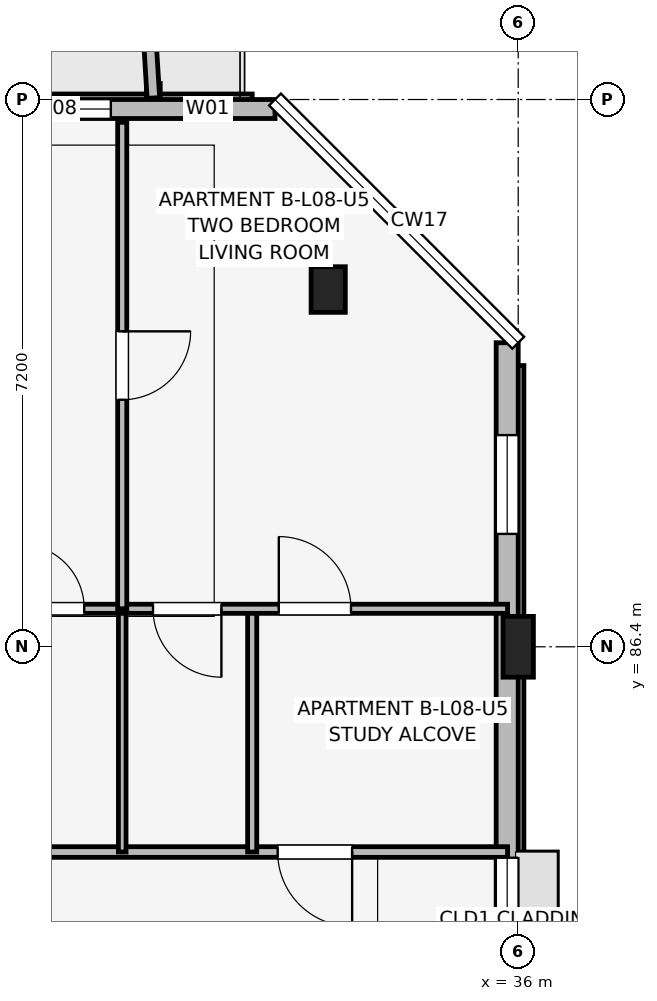
"""IFC4 building model, lengths in metres.
Left out: names, types, materials, properties, quantities, classifications, styles, units other than length and angle.
Written with IfcOpenShell. Run it as: python <this file> out.ifc"""

import sys

from ifc_helpers import new_model, si_unit, direction, frame, frame_2d, origin, origin_2d, place, context, subcontext, project, spatial, rectangle, extrude, element, fill, save


model = new_model("IFC4")
c1 = context("Model", 3, precision=1e-05, world=origin(), true_north=direction((0.0, 1.0)))
c2 = subcontext(c1, "Body", "Model", "MODEL_VIEW")
j1 = project(units=[si_unit("LENGTHUNIT", "METRE"), si_unit("PLANEANGLEUNIT", "RADIAN")], contexts=[c1])
p1 = place(None, origin())
s1 = spatial("IfcSite", under=j1, at=p1, CompositionType="ELEMENT")
p2 = place(p1, origin())
s2 = spatial("IfcBuilding", under=s1, at=p2, CompositionType="ELEMENT")
p3 = place(p2, frame((0.0, 0.0, 27.6)))
s3 = spatial("IfcBuildingStorey", under=s2, at=p3, CompositionType="ELEMENT", Elevation=27.6)
p4 = place(p3, frame((36.0, 86.4, 0.0), z_axis=(0.0, 0.0, 1.0), x_axis=(1.0, 0.0, 0.0)))
e1 = element("IfcColumn", 1, at=p4, inside=s3, PredefinedType="COLUMN", context=c2, shape_type="SweptSolid", body=[
    extrude(rectangle(XDim=0.4, YDim=0.8, at=origin_2d()), origin(), (0.0, 0.0, 1.0), 3.15),
])
p5 = place(p3, frame((33.5, 91.1, 0.0), z_axis=(0.0, 0.0, 1.0), x_axis=(1.0, 0.0, 0.0)))
e2 = element("IfcColumn", 2, at=p5, inside=s3, PredefinedType="COLUMN", context=c2, shape_type="SweptSolid", body=[
    extrude(rectangle(XDim=0.45, YDim=0.6, at=origin_2d()), origin(), (0.0, 0.0, 1.0), 3.15),
])
p6 = place(p3, frame((35.855, 75.2, 0.0), z_axis=(0.0, 0.0, 1.0), x_axis=(0.0, 1.0, 0.0)))
e3 = element("IfcWall", 3, at=p6, inside=s3, PredefinedType="SOLIDWALL", context=c2, shape_type="SweptSolid", body=[
    extrude(rectangle(XDim=15.2, YDim=0.29, at=frame_2d((7.6, 0.0))), origin(), (0.0, 0.0, 1.0), 2.43),
])
p7 = place(p6, frame((6.775, 0.0, 1.05)))
e4 = element("IfcOpeningElement", 4, at=p7, cuts=e3, PredefinedType="OPENING", context=c2, shape_type="SweptSolid", body=[
    extrude(rectangle(XDim=1.65, YDim=1.15, at=frame_2d((0.825, 0.575))), frame((0.0, 0.155, 0.0), z_axis=(0.0, -1.0, 0.0), x_axis=(1.0, 0.0, 0.0)), (0.0, 0.0, 1.0), 0.31),
])
p8 = place(p6, frame((12.685, 0.0, 0.75)))
e5 = element("IfcOpeningElement", 5, at=p8, cuts=e3, PredefinedType="OPENING", context=c2, shape_type="SweptSolid", body=[
    extrude(rectangle(XDim=1.3, YDim=1.55, at=frame_2d((0.65, 0.775))), frame((0.0, 0.155, 0.0), z_axis=(0.0, -1.0, 0.0), x_axis=(1.0, 0.0, 0.0)), (0.0, 0.0, 1.0), 0.31),
])
p9 = place(p3, frame((32.8, 93.475, 0.0), z_axis=(0.0, 0.0, 1.0), x_axis=(-1.0, 0.0, 0.0)))
e6 = element("IfcWall", 6, at=p9, inside=s3, PredefinedType="SOLIDWALL", context=c2, shape_type="SweptSolid", body=[
    extrude(rectangle(XDim=29.6, YDim=0.25, at=frame_2d((14.8, 0.0))), origin(), (0.0, 0.0, 1.0), 2.43),
])
p10 = place(p9, frame((22.825, 0.0, 0.0), z_axis=(0.0, 0.0, 1.0), x_axis=(-1.0, 0.0, 0.0)))
e7 = element("IfcOpeningElement", 7, at=p10, cuts=e6, PredefinedType="OPENING", context=c2, shape_type="SweptSolid", body=[
    extrude(rectangle(XDim=1.65, YDim=2.15, at=frame_2d((0.825, 1.075))), frame((0.0, 0.135, 0.0), z_axis=(0.0, -1.0, 0.0), x_axis=(1.0, 0.0, 0.0)), (0.0, 0.0, 1.0), 0.27),
])
p11 = place(p9, frame((8.35, 0.0, 0.0), z_axis=(0.0, 0.0, 1.0), x_axis=(-1.0, 0.0, 0.0)))
e8 = element("IfcOpeningElement", 8, at=p11, cuts=e6, PredefinedType="OPENING", context=c2, shape_type="SweptSolid", body=[
    extrude(rectangle(XDim=1.5, YDim=2.15, at=frame_2d((0.75, 1.075))), frame((0.0, 0.135, 0.0), z_axis=(0.0, -1.0, 0.0), x_axis=(1.0, 0.0, 0.0)), (0.0, 0.0, 1.0), 0.27),
])
p12 = place(p9, frame((25.99, 0.0, 0.7)))
e9 = element("IfcOpeningElement", 9, at=p12, cuts=e6, PredefinedType="OPENING", context=c2, shape_type="SweptSolid", body=[
    extrude(rectangle(XDim=1.86, YDim=1.6, at=frame_2d((0.93, 0.8))), frame((0.0, 0.135, 0.0), z_axis=(0.0, -1.0, 0.0), x_axis=(1.0, 0.0, 0.0)), (0.0, 0.0, 1.0), 0.27),
])
p13 = place(p9, frame((24.0, 0.0, 0.75)))
e10 = element("IfcOpeningElement", 10, at=p13, cuts=e6, PredefinedType="OPENING", context=c2, shape_type="SweptSolid", body=[
    extrude(rectangle(XDim=0.98, YDim=1.45, at=frame_2d((0.49, 0.725))), frame((0.0, 0.135, 0.0), z_axis=(0.0, -1.0, 0.0), x_axis=(1.0, 0.0, 0.0)), (0.0, 0.0, 1.0), 0.27),
])
p14 = place(p9, frame((16.15, 0.0, 0.7)))
e11 = element("IfcOpeningElement", 11, at=p14, cuts=e6, PredefinedType="OPENING", context=c2, shape_type="SweptSolid", body=[
    extrude(rectangle(XDim=1.86, YDim=1.6, at=frame_2d((0.93, 0.8))), frame((0.0, 0.135, 0.0), z_axis=(0.0, -1.0, 0.0), x_axis=(1.0, 0.0, 0.0)), (0.0, 0.0, 1.0), 0.27),
])
p15 = place(p9, frame((11.91, 0.0, 0.75)))
e12 = element("IfcOpeningElement", 12, at=p15, cuts=e6, PredefinedType="OPENING", context=c2, shape_type="SweptSolid", body=[
    extrude(rectangle(XDim=1.22, YDim=1.5, at=frame_2d((0.61, 0.75))), frame((0.0, 0.135, 0.0), z_axis=(0.0, -1.0, 0.0), x_axis=(1.0, 0.0, 0.0)), (0.0, 0.0, 1.0), 0.27),
])
p16 = place(p9, frame((9.42, 0.0, 0.75)))
e13 = element("IfcOpeningElement", 13, at=p16, cuts=e6, PredefinedType="OPENING", context=c2, shape_type="SweptSolid", body=[
    extrude(rectangle(XDim=1.34, YDim=1.55, at=frame_2d((0.67, 0.775))), frame((0.0, 0.135, 0.0), z_axis=(0.0, -1.0, 0.0), x_axis=(1.0, 0.0, 0.0)), (0.0, 0.0, 1.0), 0.27),
])
p17 = place(p9, frame((2.16, 0.0, 0.75)))
e14 = element("IfcOpeningElement", 14, at=p17, cuts=e6, PredefinedType="OPENING", context=c2, shape_type="SweptSolid", body=[
    extrude(rectangle(XDim=1.46, YDim=1.55, at=frame_2d((0.73, 0.775))), frame((0.0, 0.135, 0.0), z_axis=(0.0, -1.0, 0.0), x_axis=(1.0, 0.0, 0.0)), (0.0, 0.0, 1.0), 0.27),
])
p18 = place(p9, frame((0.585, 0.0, 0.75)))
e15 = element("IfcOpeningElement", 15, at=p18, cuts=e6, PredefinedType="OPENING", context=c2, shape_type="SweptSolid", body=[
    extrude(rectangle(XDim=0.6, YDim=1.25, at=frame_2d((0.3, 0.625))), frame((0.0, 0.135, 0.0), z_axis=(0.0, -1.0, 0.0), x_axis=(1.0, 0.0, 0.0)), (0.0, 0.0, 1.0), 0.27),
])
p19 = place(p3, frame((31.2, 93.62, 0.0), z_axis=(0.0, 0.0, 1.0), x_axis=(-0.061046865508, 0.998134900808, 0.0)))
e16 = element("IfcWall", 16, at=p19, inside=s3, PredefinedType="ELEMENTEDWALL", context=c2, shape_type="SweptSolid", body=[
    extrude(rectangle(XDim=1.964, YDim=0.165, at=frame_2d((0.982, 0.0))), origin(), (0.0, 0.0, 1.0), 2.95),
])
p20 = place(p3, frame((28.94, 83.7, 0.0), z_axis=(0.0, 0.0, 1.0), x_axis=(1.0, 0.0, 0.0)))
e17 = element("IfcWall", 17, at=p20, inside=s3, PredefinedType="PARTITIONING", context=c2, shape_type="SweptSolid", body=[
    extrude(rectangle(XDim=6.92, YDim=0.14, at=frame_2d((3.46, 0.0))), origin(), (0.0, 0.0, 1.0), 2.38),
])
p21 = place(p20, frame((4.875, 0.0, 0.0), z_axis=(0.0, 0.0, 1.0), x_axis=(-1.0, 0.0, 0.0)))
e18 = element("IfcOpeningElement", 18, at=p21, cuts=e17, PredefinedType="OPENING", context=c2, shape_type="SweptSolid", body=[
    extrude(rectangle(XDim=0.98, YDim=2.1, at=frame_2d((0.49, 1.05))), frame((0.0, 0.08, 0.0), z_axis=(0.0, -1.0, 0.0), x_axis=(1.0, 0.0, 0.0)), (0.0, 0.0, 1.0), 0.16),
])
p22 = place(p3, frame((30.79, 83.7, 0.0), z_axis=(0.0, 0.0, 1.0), x_axis=(0.0, 1.0, 0.0)))
e19 = element("IfcWall", 19, at=p22, inside=s3, PredefinedType="PARTITIONING", context=c2, shape_type="SweptSolid", body=[
    extrude(rectangle(XDim=3.2, YDim=0.1, at=frame_2d((1.6, 0.0))), origin(), (0.0, 0.0, 1.0), 2.38),
])
p23 = place(p3, frame((32.5, 83.7, 0.0), z_axis=(0.0, 0.0, 1.0), x_axis=(0.0, 1.0, 0.0)))
e20 = element("IfcWall", 20, at=p23, inside=s3, PredefinedType="PARTITIONING", context=c2, shape_type="SweptSolid", body=[
    extrude(rectangle(XDim=3.2, YDim=0.12, at=frame_2d((1.6, 0.0))), origin(), (0.0, 0.0, 1.0), 2.38),
])
p24 = place(p3, frame((28.94, 86.9, 0.0), z_axis=(0.0, 0.0, 1.0), x_axis=(1.0, 0.0, 0.0)))
e21 = element("IfcWall", 21, at=p24, inside=s3, PredefinedType="PARTITIONING", context=c2, shape_type="SweptSolid", body=[
    extrude(rectangle(XDim=6.92, YDim=0.12, at=frame_2d((3.46, 0.0))), origin(), (0.0, 0.0, 1.0), 2.38),
])
p25 = place(p24, frame((0.5, 0.0, 0.0)))
e22 = element("IfcOpeningElement", 22, at=p25, cuts=e21, PredefinedType="OPENING", context=c2, shape_type="SweptSolid", body=[
    extrude(rectangle(XDim=0.85, YDim=2.08, at=frame_2d((0.425, 1.04))), frame((0.0, 0.07, 0.0), z_axis=(0.0, -1.0, 0.0), x_axis=(1.0, 0.0, 0.0)), (0.0, 0.0, 1.0), 0.14),
])
p26 = place(p24, frame((3.155, 0.0, 0.0), z_axis=(0.0, 0.0, 1.0), x_axis=(-1.0, 0.0, 0.0)))
e23 = element("IfcOpeningElement", 23, at=p26, cuts=e21, PredefinedType="OPENING", context=c2, shape_type="SweptSolid", body=[
    extrude(rectangle(XDim=0.9, YDim=2.08, at=frame_2d((0.45, 1.04))), frame((0.0, 0.07, 0.0), z_axis=(0.0, -1.0, 0.0), x_axis=(1.0, 0.0, 0.0)), (0.0, 0.0, 1.0), 0.14),
])
p27 = place(p24, frame((3.91, 0.0, 0.0)))
e24 = element("IfcOpeningElement", 24, at=p27, cuts=e21, PredefinedType="OPENING", context=c2, shape_type="SweptSolid", body=[
    extrude(rectangle(XDim=0.95, YDim=2.08, at=frame_2d((0.475, 1.04))), frame((0.0, 0.07, 0.0), z_axis=(0.0, -1.0, 0.0), x_axis=(1.0, 0.0, 0.0)), (0.0, 0.0, 1.0), 0.14),
])
p28 = place(p3, frame((30.79, 86.9, 0.0), z_axis=(0.0, 0.0, 1.0), x_axis=(0.0, 1.0, 0.0)))
e25 = element("IfcWall", 25, at=p28, inside=s3, PredefinedType="PARTITIONING", context=c2, shape_type="SweptSolid", body=[
    extrude(rectangle(XDim=6.4, YDim=0.12, at=frame_2d((3.2, 0.0))), origin(), (0.0, 0.0, 1.0), 2.38),
])
p29 = place(p28, frame((3.65, 0.0, 0.0), z_axis=(0.0, 0.0, 1.0), x_axis=(-1.0, 0.0, 0.0)))
e26 = element("IfcOpeningElement", 26, at=p29, cuts=e25, PredefinedType="OPENING", context=c2, shape_type="SweptSolid", body=[
    extrude(rectangle(XDim=0.9, YDim=2.08, at=frame_2d((0.45, 1.04))), frame((0.0, 0.07, 0.0), z_axis=(0.0, -1.0, 0.0), x_axis=(1.0, 0.0, 0.0)), (0.0, 0.0, 1.0), 0.14),
])
p30 = place(p17, origin())
e27 = element("IfcWindow", 27, at=p30, inside=s3, PartitioningType="SINGLE_PANEL", PredefinedType="WINDOW", context=c2, shape_type="SweptSolid", body=[
    extrude(rectangle(XDim=1.46, YDim=1.55, at=frame_2d((0.73, 0.775))), frame((0.0, 0.03, 0.0), z_axis=(0.0, -1.0, 0.0), x_axis=(1.0, 0.0, 0.0)), (0.0, 0.0, 1.0), 0.06),
])
fill(e14, e27)
p31 = place(p18, origin())
e28 = element("IfcWindow", 28, at=p31, inside=s3, PartitioningType="SINGLE_PANEL", PredefinedType="WINDOW", context=c2, shape_type="SweptSolid", body=[
    extrude(rectangle(XDim=0.6, YDim=1.25, at=frame_2d((0.3, 0.625))), frame((0.0, 0.03, 0.0), z_axis=(0.0, -1.0, 0.0), x_axis=(1.0, 0.0, 0.0)), (0.0, 0.0, 1.0), 0.06),
])
fill(e15, e28)
p32 = place(p7, origin())
e29 = element("IfcWindow", 29, at=p32, inside=s3, PartitioningType="SINGLE_PANEL", PredefinedType="WINDOW", context=c2, shape_type="SweptSolid", body=[
    extrude(rectangle(XDim=1.65, YDim=1.15, at=frame_2d((0.825, 0.575))), frame((0.0, 0.03, 0.0), z_axis=(0.0, -1.0, 0.0), x_axis=(1.0, 0.0, 0.0)), (0.0, 0.0, 1.0), 0.06),
])
fill(e4, e29)
p33 = place(p8, origin())
e30 = element("IfcWindow", 30, at=p33, inside=s3, PartitioningType="SINGLE_PANEL", PredefinedType="WINDOW", context=c2, shape_type="SweptSolid", body=[
    extrude(rectangle(XDim=1.3, YDim=1.55, at=frame_2d((0.65, 0.775))), frame((0.0, 0.03, 0.0), z_axis=(0.0, -1.0, 0.0), x_axis=(1.0, 0.0, 0.0)), (0.0, 0.0, 1.0), 0.06),
])
fill(e5, e30)
p34 = place(p21, origin())
e31 = element("IfcDoor", 31, at=p34, inside=s3, OperationType="SINGLE_SWING_RIGHT", PredefinedType="DOOR", context=c2, shape_type="SweptSolid", body=[
    extrude(rectangle(XDim=0.98, YDim=2.1, at=frame_2d((0.49, 1.05))), frame((0.0, 0.025, 0.0), z_axis=(0.0, -1.0, 0.0), x_axis=(1.0, 0.0, 0.0)), (0.0, 0.0, 1.0), 0.05),
])
fill(e18, e31)
p35 = place(p25, origin())
e32 = element("IfcDoor", 32, at=p35, inside=s3, OperationType="SINGLE_SWING_LEFT", PredefinedType="DOOR", context=c2, shape_type="SweptSolid", body=[
    extrude(rectangle(XDim=0.85, YDim=2.08, at=frame_2d((0.425, 1.04))), frame((0.0, 0.025, 0.0), z_axis=(0.0, -1.0, 0.0), x_axis=(1.0, 0.0, 0.0)), (0.0, 0.0, 1.0), 0.05),
])
fill(e22, e32)
p36 = place(p26, origin())
e33 = element("IfcDoor", 33, at=p36, inside=s3, OperationType="SINGLE_SWING_RIGHT", PredefinedType="DOOR", context=c2, shape_type="SweptSolid", body=[
    extrude(rectangle(XDim=0.9, YDim=2.08, at=frame_2d((0.45, 1.04))), frame((0.0, 0.025, 0.0), z_axis=(0.0, -1.0, 0.0), x_axis=(1.0, 0.0, 0.0)), (0.0, 0.0, 1.0), 0.05),
])
fill(e23, e33)
p37 = place(p27, origin())
e34 = element("IfcDoor", 34, at=p37, inside=s3, OperationType="SINGLE_SWING_LEFT", PredefinedType="DOOR", context=c2, shape_type="SweptSolid", body=[
    extrude(rectangle(XDim=0.95, YDim=2.08, at=frame_2d((0.475, 1.04))), frame((0.0, 0.025, 0.0), z_axis=(0.0, -1.0, 0.0), x_axis=(1.0, 0.0, 0.0)), (0.0, 0.0, 1.0), 0.05),
])
fill(e24, e34)
p38 = place(p29, origin())
e35 = element("IfcDoor", 35, at=p38, inside=s3, OperationType="SINGLE_SWING_RIGHT", PredefinedType="DOOR", context=c2, shape_type="SweptSolid", body=[
    extrude(rectangle(XDim=0.9, YDim=2.08, at=frame_2d((0.45, 1.04))), frame((0.0, 0.025, 0.0), z_axis=(0.0, -1.0, 0.0), x_axis=(1.0, 0.0, 0.0)), (0.0, 0.0, 1.0), 0.05),
])
fill(e26, e35)
save(model, sys.argv[1])
